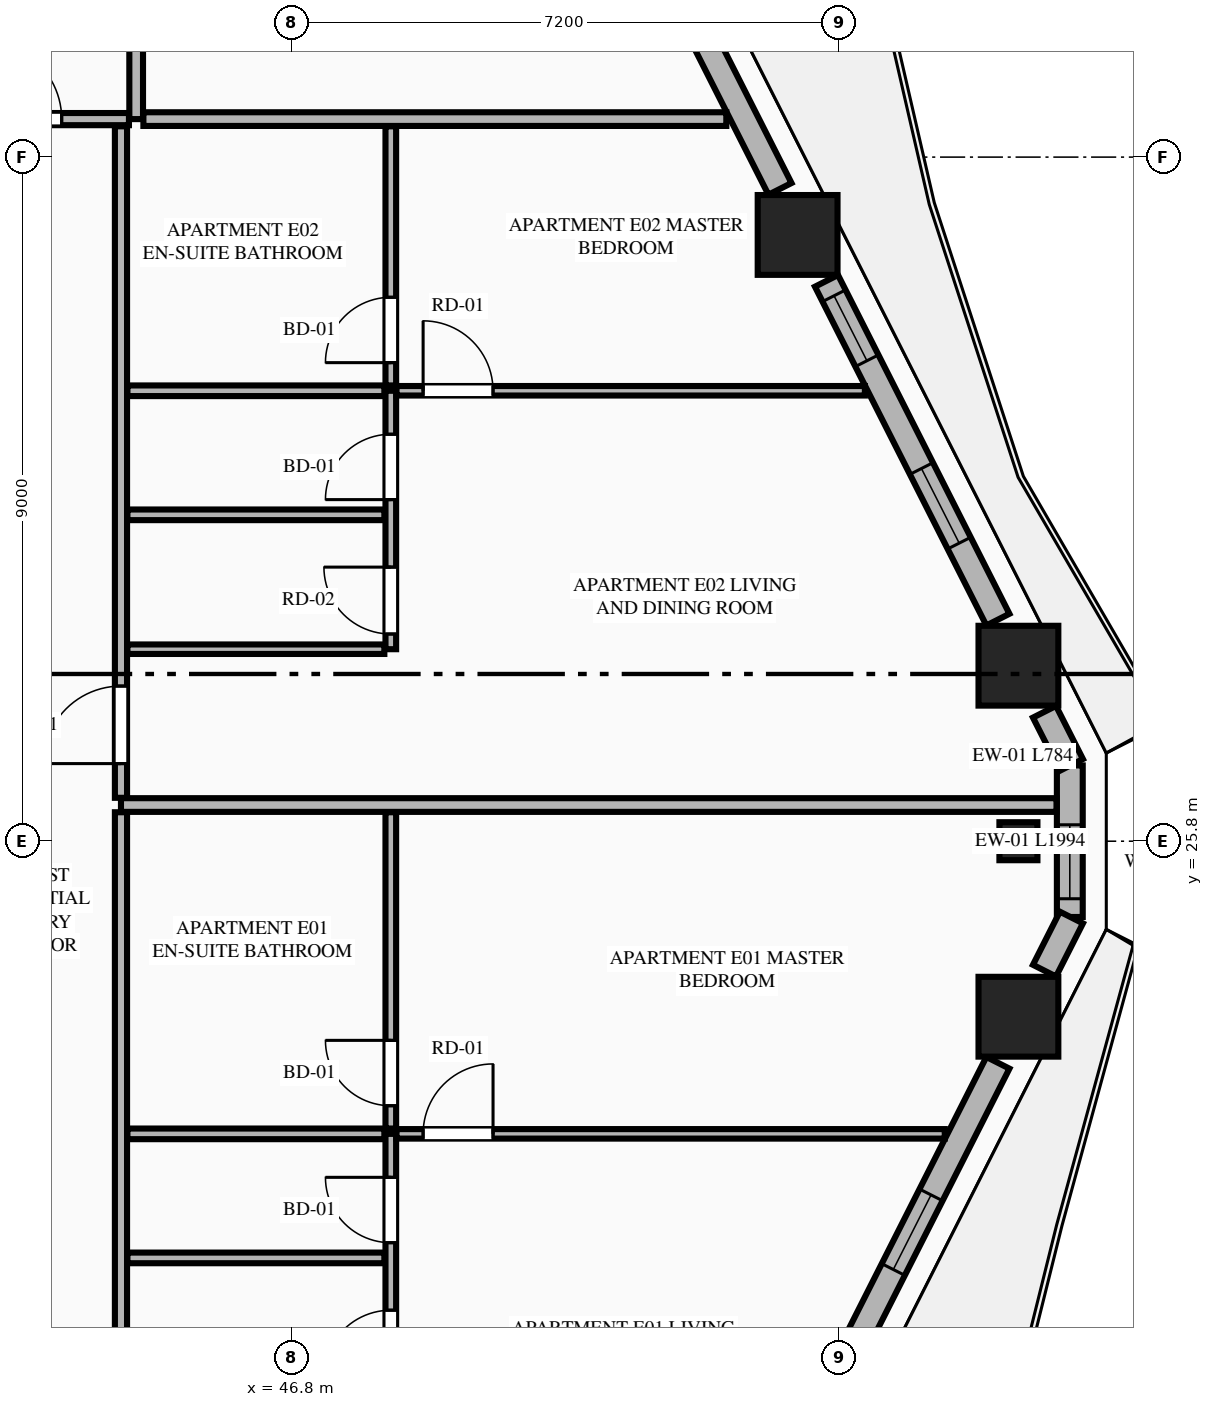
"""IFC4 building model, lengths in metres.
Left out: names, types, materials, properties, quantities, classifications, styles, units other than length and angle.
Written with IfcOpenShell. Run it as: python <this file> out.ifc"""

import sys

from ifc_helpers import new_model, si_unit, direction, frame, frame_2d, origin, origin_2d, place, context, subcontext, project, spatial, rectangle, extrude, element, fill, save


model = new_model("IFC4")
c1 = context("Model", 3, precision=1e-05, world=origin(), true_north=direction((0.0, 1.0)))
c2 = subcontext(c1, "Body", "Model", "MODEL_VIEW")
j1 = project(units=[si_unit("LENGTHUNIT", "METRE"), si_unit("PLANEANGLEUNIT", "RADIAN")], contexts=[c1])
p1 = place(None, origin())
s1 = spatial("IfcSite", under=j1, at=p1, CompositionType="ELEMENT")
p2 = place(p1, origin())
s2 = spatial("IfcBuilding", under=s1, at=p2, CompositionType="ELEMENT")
p3 = place(p2, frame((0.0, 0.0, 105.5)))
s3 = spatial("IfcBuildingStorey", under=s2, at=p3, CompositionType="ELEMENT", Elevation=105.5)
for number, where, z_axis, x_axis in (
    (1, (56.357, 23.491, 0.0), (0.0, 0.0, 1.0), (1.0, 0.0, 0.0)),
    (2, (56.357, 28.109, 0.0), (0.0, 0.0, 1.0), (1.0, 0.0, 0.0)),
    (3, (53.452, 33.776, 0.0), (0.0, 0.0, 1.0), (1.0, 0.0, 0.0)),
):
    element("IfcColumn", number, at=place(p3, frame(where, z_axis=z_axis, x_axis=x_axis)), inside=s3, PredefinedType="COLUMN", context=c2, shape_type="SweptSolid", body=[
        extrude(rectangle(XDim=1.05, YDim=1.05, at=origin_2d()), origin(), (0.0, 0.0, 1.0), 3.55),
    ])
p4 = place(p3, frame((56.357, 25.8, 0.0), z_axis=(0.0, 0.0, 1.0), x_axis=(0.0, 1.0, 0.0)))
e4 = element("IfcColumn", 4, at=p4, inside=s3, PredefinedType="PILASTER", context=c2, shape_type="SweptSolid", body=[
    extrude(rectangle(XDim=0.5, YDim=0.35, at=origin_2d()), origin(), (0.0, 0.0, 1.0), 3.55),
])
p5 = place(p3, frame((57.033, 24.803, 0.0), z_axis=(0.0, 0.0, 1.0), x_axis=(0.0, 1.0, 0.0)))
e5 = element("IfcWall", 5, at=p5, inside=s3, PredefinedType="STANDARD", context=c2, shape_type="SweptSolid", body=[
    extrude(rectangle(XDim=1.994, YDim=0.34, at=frame_2d((0.997, 0.0))), origin(), (0.0, 0.0, 1.0), 3.34),
])
p6 = place(p5, frame((0.24, 0.0, 0.75)))
e6 = element("IfcOpeningElement", 6, at=p6, cuts=e5, PredefinedType="OPENING", context=c2, shape_type="SweptSolid", body=[
    extrude(rectangle(XDim=0.973, YDim=2.0, at=frame_2d((0.486, 1.0))), frame((0.0, 0.18, 0.0), z_axis=(0.0, -1.0, 0.0), x_axis=(1.0, 0.0, 0.0)), (0.0, 0.0, 1.0), 0.36),
])
p7 = place(p3, frame((53.832, 18.428, 0.0), z_axis=(0.0, 0.0, 1.0), x_axis=(0.451431617681, 0.892305718102, 0.0)))
e7 = element("IfcWall", 7, at=p7, inside=s3, PredefinedType="STANDARD", context=c2, shape_type="SweptSolid", body=[
    extrude(rectangle(XDim=4.995, YDim=0.34, at=frame_2d((2.498, 0.0))), origin(), (0.0, 0.0, 1.0), 2.797),
])
p8 = place(p7, frame((1.947, 0.0, 0.75)))
e8 = element("IfcOpeningElement", 8, at=p8, cuts=e7, PredefinedType="OPENING", context=c2, shape_type="SweptSolid", body=[
    extrude(rectangle(XDim=1.1, YDim=1.897, at=frame_2d((0.55, 0.948))), frame((0.0, 0.18, 0.0), z_axis=(0.0, -1.0, 0.0), x_axis=(1.0, 0.0, 0.0)), (0.0, 0.0, 1.0), 0.36),
])
for number, where, z_axis, x_axis in (
    (9, (56.7, 24.097, 0.0), (0.0, 0.0, 1.0), (0.452, 0.892, 0.0)),
    (10, (57.054, 26.804, 0.0), (0.0, 0.0, 1.0), (-0.452, 0.892, 0.0)),
):
    element("IfcWall", number, at=place(p3, frame(where, z_axis=z_axis, x_axis=x_axis)), inside=s3, PredefinedType="STANDARD", context=c2, shape_type="SweptSolid", body=[
        extrude(rectangle(XDim=0.783, YDim=0.34, at=frame_2d((0.392, 0.0))), origin(), (0.0, 0.0, 1.0), 3.34),
    ])
p9 = place(p3, frame((56.087, 28.715, 0.0), z_axis=(0.0, 0.0, 1.0), x_axis=(-0.451431617681, 0.892305718102, 0.0)))
e11 = element("IfcWall", 11, at=p9, inside=s3, PredefinedType="STANDARD", context=c2, shape_type="SweptSolid", body=[
    extrude(rectangle(XDim=4.995, YDim=0.34, at=frame_2d((2.498, 0.0))), origin(), (0.0, 0.0, 1.0), 2.797),
])
p10 = place(p9, frame((1.128, 0.0, 0.75)))
e12 = element("IfcOpeningElement", 12, at=p10, cuts=e11, PredefinedType="OPENING", context=c2, shape_type="SweptSolid", body=[
    extrude(rectangle(XDim=1.1, YDim=1.897, at=frame_2d((0.55, 0.948))), frame((0.0, 0.18, 0.0), z_axis=(0.0, -1.0, 0.0), x_axis=(1.0, 0.0, 0.0)), (0.0, 0.0, 1.0), 0.36),
])
p11 = place(p9, frame((3.817, 0.0, 0.75)))
e13 = element("IfcOpeningElement", 13, at=p11, cuts=e11, PredefinedType="OPENING", context=c2, shape_type="SweptSolid", body=[
    extrude(rectangle(XDim=0.958, YDim=1.897, at=frame_2d((0.479, 0.948))), frame((0.0, 0.18, 0.0), z_axis=(0.0, -1.0, 0.0), x_axis=(1.0, 0.0, 0.0)), (0.0, 0.0, 1.0), 0.36),
])
p12 = place(p3, frame((53.22, 34.382, 0.0), z_axis=(0.0, 0.0, 1.0), x_axis=(-0.451567731634, 0.892236842855, 0.0)))
e14 = element("IfcWall", 14, at=p12, inside=s3, PredefinedType="STANDARD", context=c2, shape_type="SweptSolid", body=[
    extrude(rectangle(XDim=5.219, YDim=0.34, at=frame_2d((2.61, 0.0))), origin(), (0.0, 0.0, 1.0), 2.797),
])
p13 = place(p12, frame((2.699, 0.0, 0.0)))
e15 = element("IfcOpeningElement", 15, at=p13, cuts=e14, PredefinedType="OPENING", context=c2, shape_type="SweptSolid", body=[
    extrude(rectangle(XDim=1.1, YDim=2.25, at=frame_2d((0.55, 1.125))), frame((0.0, 0.18, 0.0), z_axis=(0.0, -1.0, 0.0), x_axis=(1.0, 0.0, 0.0)), (0.0, 0.0, 1.0), 0.36),
])
p14 = place(p3, frame((44.75, 35.3, 0.0), z_axis=(0.0, 0.0, 1.0), x_axis=(0.0, 1.0, 0.0)))
e16 = element("IfcWall", 16, at=p14, inside=s3, PredefinedType="PARTITIONING", context=c2, shape_type="SweptSolid", body=[
    extrude(rectangle(XDim=12.195, YDim=0.18, at=frame_2d((6.098, 0.0))), origin(), (0.0, 0.0, 1.0), 3.34),
])
p15 = place(p3, frame((28.663, 35.3, 0.0), z_axis=(0.0, 0.0, 1.0), x_axis=(1.0, 0.0, 0.0)))
e17 = element("IfcWall", 17, at=p15, inside=s3, PredefinedType="PARTITIONING", context=c2, shape_type="SweptSolid", body=[
    extrude(rectangle(XDim=15.992, YDim=0.16, at=frame_2d((7.996, 0.0))), origin(), (0.0, 0.0, 1.0), 3.34),
])
p16 = place(p15, frame((14.087, 0.0, 0.0)))
e18 = element("IfcOpeningElement", 18, at=p16, cuts=e17, PredefinedType="OPENING", context=c2, shape_type="SweptSolid", body=[
    extrude(rectangle(XDim=1.02, YDim=2.25, at=frame_2d((0.51, 1.125))), frame((0.0, 0.09, 0.0), z_axis=(0.0, -1.0, 0.0), x_axis=(1.0, 0.0, 0.0)), (0.0, 0.0, 1.0), 0.18),
])
p17 = place(p3, frame((44.845, 35.3, 0.0), z_axis=(0.0, 0.0, 1.0), x_axis=(1.0, 0.0, 0.0)))
e19 = element("IfcWall", 19, at=p17, inside=s3, PredefinedType="PARTITIONING", context=c2, shape_type="SweptSolid", body=[
    extrude(rectangle(XDim=7.669, YDim=0.18, at=frame_2d((3.834, 0.0))), origin(), (0.0, 0.0, 1.0), 3.34),
])
p18 = place(p3, frame((44.55, 16.595, 0.0), z_axis=(0.0, 0.0, 1.0), x_axis=(0.0, 1.0, 0.0)))
e20 = element("IfcWall", 20, at=p18, inside=s3, PredefinedType="PARTITIONING", context=c2, shape_type="SweptSolid", body=[
    extrude(rectangle(XDim=9.586, YDim=0.16, at=frame_2d((4.793, 0.0))), origin(), (0.0, 0.0, 1.0), 3.34),
])
p19 = place(p18, frame((0.45, 0.0, 0.0)))
e21 = element("IfcOpeningElement", 21, at=p19, cuts=e20, PredefinedType="OPENING", context=c2, shape_type="SweptSolid", body=[
    extrude(rectangle(XDim=1.02, YDim=2.25, at=frame_2d((0.51, 1.125))), frame((0.0, 0.09, 0.0), z_axis=(0.0, -1.0, 0.0), x_axis=(1.0, 0.0, 0.0)), (0.0, 0.0, 1.0), 0.18),
])
p20 = place(p3, frame((48.1, 18.55, 0.0), z_axis=(0.0, 0.0, 1.0), x_axis=(0.0, 1.0, 0.0)))
e22 = element("IfcWall", 22, at=p20, inside=s3, PredefinedType="PLUMBINGWALL", context=c2, shape_type="SweptSolid", body=[
    extrude(rectangle(XDim=3.4, YDim=0.14, at=frame_2d((1.7, 0.0))), origin(), (0.0, 0.0, 1.0), 3.34),
])
p21 = place(p20, frame((0.2, 0.0, 0.0)))
e23 = element("IfcOpeningElement", 23, at=p21, cuts=e22, PredefinedType="OPENING", context=c2, shape_type="SweptSolid", body=[
    extrude(rectangle(XDim=0.88, YDim=2.15, at=frame_2d((0.44, 1.075))), frame((0.0, 0.08, 0.0), z_axis=(0.0, -1.0, 0.0), x_axis=(1.0, 0.0, 0.0)), (0.0, 0.0, 1.0), 0.16),
])
p22 = place(p20, frame((1.968, 0.0, 0.0)))
e24 = element("IfcOpeningElement", 24, at=p22, cuts=e22, PredefinedType="OPENING", context=c2, shape_type="SweptSolid", body=[
    extrude(rectangle(XDim=0.86, YDim=2.1, at=frame_2d((0.43, 1.05))), frame((0.0, 0.08, 0.0), z_axis=(0.0, -1.0, 0.0), x_axis=(1.0, 0.0, 0.0)), (0.0, 0.0, 1.0), 0.16),
])
p23 = place(p3, frame((48.1, 22.02, 0.0), z_axis=(0.0, 0.0, 1.0), x_axis=(0.0, 1.0, 0.0)))
e25 = element("IfcWall", 25, at=p23, inside=s3, PredefinedType="PLUMBINGWALL", context=c2, shape_type="SweptSolid", body=[
    extrude(rectangle(XDim=4.161, YDim=0.14, at=frame_2d((2.081, 0.0))), origin(), (0.0, 0.0, 1.0), 3.34),
])
p24 = place(p23, frame((0.3, 0.0, 0.0)))
e26 = element("IfcOpeningElement", 26, at=p24, cuts=e25, PredefinedType="OPENING", context=c2, shape_type="SweptSolid", body=[
    extrude(rectangle(XDim=0.86, YDim=2.1, at=frame_2d((0.43, 1.05))), frame((0.0, 0.08, 0.0), z_axis=(0.0, -1.0, 0.0), x_axis=(1.0, 0.0, 0.0)), (0.0, 0.0, 1.0), 0.16),
])
p25 = place(p3, frame((44.635, 21.95, 0.0), z_axis=(0.0, 0.0, 1.0), x_axis=(1.0, 0.0, 0.0)))
e27 = element("IfcWall", 27, at=p25, inside=s3, PredefinedType="PLUMBINGWALL", context=c2, shape_type="SweptSolid", body=[
    extrude(rectangle(XDim=3.38, YDim=0.14, at=frame_2d((1.69, 0.0))), origin(), (0.0, 0.0, 1.0), 3.34),
])
p26 = place(p3, frame((48.175, 21.95, 0.0), z_axis=(0.0, 0.0, 1.0), x_axis=(1.0, 0.0, 0.0)))
e28 = element("IfcWall", 28, at=p26, inside=s3, PredefinedType="PARTITIONING", context=c2, shape_type="SweptSolid", body=[
    extrude(rectangle(XDim=7.213, YDim=0.125, at=frame_2d((3.606, 0.0))), origin(), (0.0, 0.0, 1.0), 3.34),
])
p27 = place(p26, frame((0.35, 0.0, 0.0)))
e29 = element("IfcOpeningElement", 29, at=p27, cuts=e28, PredefinedType="OPENING", context=c2, shape_type="SweptSolid", body=[
    extrude(rectangle(XDim=0.92, YDim=2.15, at=frame_2d((0.46, 1.075))), frame((0.0, 0.073, 0.0), z_axis=(0.0, -1.0, 0.0), x_axis=(1.0, 0.0, 0.0)), (0.0, 0.0, 1.0), 0.145),
])
p28 = place(p3, frame((44.635, 20.318, 0.0), z_axis=(0.0, 0.0, 1.0), x_axis=(1.0, 0.0, 0.0)))
e30 = element("IfcWall", 30, at=p28, inside=s3, PredefinedType="PLUMBINGWALL", context=c2, shape_type="SweptSolid", body=[
    extrude(rectangle(XDim=3.38, YDim=0.14, at=frame_2d((1.69, 0.0))), origin(), (0.0, 0.0, 1.0), 3.34),
])
p29 = place(p3, frame((44.55, 26.276, 0.0), z_axis=(0.0, 0.0, 1.0), x_axis=(1.0, 0.0, 0.0)))
e31 = element("IfcWall", 31, at=p29, inside=s3, PredefinedType="PARTITIONING", context=c2, shape_type="SweptSolid", body=[
    extrude(rectangle(XDim=12.308, YDim=0.18, at=frame_2d((6.154, 0.0))), origin(), (0.0, 0.0, 1.0), 3.34),
])
p30 = place(p3, frame((44.55, 26.371, 0.0), z_axis=(0.0, 0.0, 1.0), x_axis=(0.0, 1.0, 0.0)))
e32 = element("IfcWall", 32, at=p30, inside=s3, PredefinedType="PARTITIONING", context=c2, shape_type="SweptSolid", body=[
    extrude(rectangle(XDim=8.834, YDim=0.16, at=frame_2d((4.417, 0.0))), origin(), (0.0, 0.0, 1.0), 3.34),
])
p31 = place(p30, frame((0.45, 0.0, 0.0)))
e33 = element("IfcOpeningElement", 33, at=p31, cuts=e32, PredefinedType="OPENING", context=c2, shape_type="SweptSolid", body=[
    extrude(rectangle(XDim=1.02, YDim=2.25, at=frame_2d((0.51, 1.125))), frame((0.0, 0.09, 0.0), z_axis=(0.0, -1.0, 0.0), x_axis=(1.0, 0.0, 0.0)), (0.0, 0.0, 1.0), 0.18),
])
p32 = place(p3, frame((44.635, 28.326, 0.0), z_axis=(0.0, 0.0, 1.0), x_axis=(1.0, 0.0, 0.0)))
e34 = element("IfcWall", 34, at=p32, inside=s3, PredefinedType="PARTITIONING", context=c2, shape_type="SweptSolid", body=[
    extrude(rectangle(XDim=3.38, YDim=0.125, at=frame_2d((1.69, 0.0))), origin(), (0.0, 0.0, 1.0), 3.34),
])
p33 = place(p3, frame((48.1, 28.326, 0.0), z_axis=(0.0, 0.0, 1.0), x_axis=(0.0, 1.0, 0.0)))
e35 = element("IfcWall", 35, at=p33, inside=s3, PredefinedType="PLUMBINGWALL", context=c2, shape_type="SweptSolid", body=[
    extrude(rectangle(XDim=3.4, YDim=0.14, at=frame_2d((1.7, 0.0))), origin(), (0.0, 0.0, 1.0), 3.34),
])
p34 = place(p33, frame((0.2, 0.0, 0.0)))
e36 = element("IfcOpeningElement", 36, at=p34, cuts=e35, PredefinedType="OPENING", context=c2, shape_type="SweptSolid", body=[
    extrude(rectangle(XDim=0.88, YDim=2.15, at=frame_2d((0.44, 1.075))), frame((0.0, 0.08, 0.0), z_axis=(0.0, -1.0, 0.0), x_axis=(1.0, 0.0, 0.0)), (0.0, 0.0, 1.0), 0.16),
])
p35 = place(p33, frame((1.968, 0.0, 0.0)))
e37 = element("IfcOpeningElement", 37, at=p35, cuts=e35, PredefinedType="OPENING", context=c2, shape_type="SweptSolid", body=[
    extrude(rectangle(XDim=0.86, YDim=2.1, at=frame_2d((0.43, 1.05))), frame((0.0, 0.08, 0.0), z_axis=(0.0, -1.0, 0.0), x_axis=(1.0, 0.0, 0.0)), (0.0, 0.0, 1.0), 0.16),
])
p36 = place(p3, frame((48.1, 31.796, 0.0), z_axis=(0.0, 0.0, 1.0), x_axis=(0.0, 1.0, 0.0)))
e38 = element("IfcWall", 38, at=p36, inside=s3, PredefinedType="PLUMBINGWALL", context=c2, shape_type="SweptSolid", body=[
    extrude(rectangle(XDim=3.409, YDim=0.14, at=frame_2d((1.705, 0.0))), origin(), (0.0, 0.0, 1.0), 3.34),
])
p37 = place(p36, frame((0.3, 0.0, 0.0)))
e39 = element("IfcOpeningElement", 39, at=p37, cuts=e38, PredefinedType="OPENING", context=c2, shape_type="SweptSolid", body=[
    extrude(rectangle(XDim=0.86, YDim=2.1, at=frame_2d((0.43, 1.05))), frame((0.0, 0.08, 0.0), z_axis=(0.0, -1.0, 0.0), x_axis=(1.0, 0.0, 0.0)), (0.0, 0.0, 1.0), 0.16),
])
p38 = place(p3, frame((44.635, 31.726, 0.0), z_axis=(0.0, 0.0, 1.0), x_axis=(1.0, 0.0, 0.0)))
e40 = element("IfcWall", 40, at=p38, inside=s3, PredefinedType="PLUMBINGWALL", context=c2, shape_type="SweptSolid", body=[
    extrude(rectangle(XDim=3.38, YDim=0.14, at=frame_2d((1.69, 0.0))), origin(), (0.0, 0.0, 1.0), 3.34),
])
p39 = place(p3, frame((48.175, 31.726, 0.0), z_axis=(0.0, 0.0, 1.0), x_axis=(1.0, 0.0, 0.0)))
e41 = element("IfcWall", 41, at=p39, inside=s3, PredefinedType="PARTITIONING", context=c2, shape_type="SweptSolid", body=[
    extrude(rectangle(XDim=6.162, YDim=0.125, at=frame_2d((3.081, 0.0))), origin(), (0.0, 0.0, 1.0), 3.34),
])
p40 = place(p39, frame((0.35, 0.0, 0.0)))
e42 = element("IfcOpeningElement", 42, at=p40, cuts=e41, PredefinedType="OPENING", context=c2, shape_type="SweptSolid", body=[
    extrude(rectangle(XDim=0.92, YDim=2.15, at=frame_2d((0.46, 1.075))), frame((0.0, 0.073, 0.0), z_axis=(0.0, -1.0, 0.0), x_axis=(1.0, 0.0, 0.0)), (0.0, 0.0, 1.0), 0.145),
])
p41 = place(p3, frame((44.635, 30.094, 0.0), z_axis=(0.0, 0.0, 1.0), x_axis=(1.0, 0.0, 0.0)))
e43 = element("IfcWall", 43, at=p41, inside=s3, PredefinedType="PLUMBINGWALL", context=c2, shape_type="SweptSolid", body=[
    extrude(rectangle(XDim=3.38, YDim=0.14, at=frame_2d((1.69, 0.0))), origin(), (0.0, 0.0, 1.0), 3.34),
])
p42 = place(p8, origin())
e44 = element("IfcWindow", 44, at=p42, inside=s3, PartitioningType="SINGLE_PANEL", PredefinedType="WINDOW", context=c2, shape_type="SweptSolid", body=[
    extrude(rectangle(XDim=1.1, YDim=1.897, at=frame_2d((0.55, 0.948))), frame((0.0, 0.03, 0.0), z_axis=(0.0, -1.0, 0.0), x_axis=(1.0, 0.0, 0.0)), (0.0, 0.0, 1.0), 0.06),
])
fill(e8, e44)
p43 = place(p10, origin())
e45 = element("IfcWindow", 45, at=p43, inside=s3, PartitioningType="SINGLE_PANEL", PredefinedType="WINDOW", context=c2, shape_type="SweptSolid", body=[
    extrude(rectangle(XDim=1.1, YDim=1.897, at=frame_2d((0.55, 0.948))), frame((0.0, 0.03, 0.0), z_axis=(0.0, -1.0, 0.0), x_axis=(1.0, 0.0, 0.0)), (0.0, 0.0, 1.0), 0.06),
])
fill(e12, e45)
p44 = place(p16, origin())
e46 = element("IfcDoor", 46, at=p44, inside=s3, OperationType="SINGLE_SWING_LEFT", PredefinedType="DOOR", context=c2, shape_type="SweptSolid", body=[
    extrude(rectangle(XDim=1.02, YDim=2.25, at=frame_2d((0.51, 1.125))), frame((0.0, 0.025, 0.0), z_axis=(0.0, -1.0, 0.0), x_axis=(1.0, 0.0, 0.0)), (0.0, 0.0, 1.0), 0.05),
])
fill(e18, e46)
p45 = place(p21, origin())
e47 = element("IfcDoor", 47, at=p45, inside=s3, OperationType="SINGLE_SWING_LEFT", PredefinedType="DOOR", context=c2, shape_type="SweptSolid", body=[
    extrude(rectangle(XDim=0.88, YDim=2.15, at=frame_2d((0.44, 1.075))), frame((0.0, 0.025, 0.0), z_axis=(0.0, -1.0, 0.0), x_axis=(1.0, 0.0, 0.0)), (0.0, 0.0, 1.0), 0.05),
])
fill(e23, e47)
p46 = place(p22, origin())
e48 = element("IfcDoor", 48, at=p46, inside=s3, OperationType="SINGLE_SWING_RIGHT", PredefinedType="DOOR", context=c2, shape_type="SweptSolid", body=[
    extrude(rectangle(XDim=0.86, YDim=2.1, at=frame_2d((0.43, 1.05))), frame((0.0, 0.025, 0.0), z_axis=(0.0, -1.0, 0.0), x_axis=(1.0, 0.0, 0.0)), (0.0, 0.0, 1.0), 0.05),
])
fill(e24, e48)
p47 = place(p24, origin())
e49 = element("IfcDoor", 49, at=p47, inside=s3, OperationType="SINGLE_SWING_RIGHT", PredefinedType="DOOR", context=c2, shape_type="SweptSolid", body=[
    extrude(rectangle(XDim=0.86, YDim=2.1, at=frame_2d((0.43, 1.05))), frame((0.0, 0.025, 0.0), z_axis=(0.0, -1.0, 0.0), x_axis=(1.0, 0.0, 0.0)), (0.0, 0.0, 1.0), 0.05),
])
fill(e26, e49)
p48 = place(p27, origin())
e50 = element("IfcDoor", 50, at=p48, inside=s3, OperationType="SINGLE_SWING_RIGHT", PredefinedType="DOOR", context=c2, shape_type="SweptSolid", body=[
    extrude(rectangle(XDim=0.92, YDim=2.15, at=frame_2d((0.46, 1.075))), frame((0.0, 0.025, 0.0), z_axis=(0.0, -1.0, 0.0), x_axis=(1.0, 0.0, 0.0)), (0.0, 0.0, 1.0), 0.05),
])
fill(e29, e50)
p49 = place(p34, origin())
e51 = element("IfcDoor", 51, at=p49, inside=s3, OperationType="SINGLE_SWING_RIGHT", PredefinedType="DOOR", context=c2, shape_type="SweptSolid", body=[
    extrude(rectangle(XDim=0.88, YDim=2.15, at=frame_2d((0.44, 1.075))), frame((0.0, 0.025, 0.0), z_axis=(0.0, -1.0, 0.0), x_axis=(1.0, 0.0, 0.0)), (0.0, 0.0, 1.0), 0.05),
])
fill(e36, e51)
p50 = place(p35, origin())
e52 = element("IfcDoor", 52, at=p50, inside=s3, OperationType="SINGLE_SWING_LEFT", PredefinedType="DOOR", context=c2, shape_type="SweptSolid", body=[
    extrude(rectangle(XDim=0.86, YDim=2.1, at=frame_2d((0.43, 1.05))), frame((0.0, 0.025, 0.0), z_axis=(0.0, -1.0, 0.0), x_axis=(1.0, 0.0, 0.0)), (0.0, 0.0, 1.0), 0.05),
])
fill(e37, e52)
p51 = place(p37, origin())
e53 = element("IfcDoor", 53, at=p51, inside=s3, OperationType="SINGLE_SWING_LEFT", PredefinedType="DOOR", context=c2, shape_type="SweptSolid", body=[
    extrude(rectangle(XDim=0.86, YDim=2.1, at=frame_2d((0.43, 1.05))), frame((0.0, 0.025, 0.0), z_axis=(0.0, -1.0, 0.0), x_axis=(1.0, 0.0, 0.0)), (0.0, 0.0, 1.0), 0.05),
])
fill(e39, e53)
p52 = place(p31, origin())
e54 = element("IfcDoor", 54, at=p52, inside=s3, OperationType="SINGLE_SWING_LEFT", PredefinedType="DOOR", context=c2, shape_type="SweptSolid", body=[
    extrude(rectangle(XDim=1.02, YDim=2.25, at=frame_2d((0.51, 1.125))), frame((0.0, 0.025, 0.0), z_axis=(0.0, -1.0, 0.0), x_axis=(1.0, 0.0, 0.0)), (0.0, 0.0, 1.0), 0.05),
])
fill(e33, e54)
p53 = place(p40, origin())
e55 = element("IfcDoor", 55, at=p53, inside=s3, OperationType="SINGLE_SWING_LEFT", PredefinedType="DOOR", context=c2, shape_type="SweptSolid", body=[
    extrude(rectangle(XDim=0.92, YDim=2.15, at=frame_2d((0.46, 1.075))), frame((0.0, 0.025, 0.0), z_axis=(0.0, -1.0, 0.0), x_axis=(1.0, 0.0, 0.0)), (0.0, 0.0, 1.0), 0.05),
])
fill(e42, e55)
p54 = place(p11, origin())
e56 = element("IfcWindow", 56, at=p54, inside=s3, PartitioningType="SINGLE_PANEL", PredefinedType="WINDOW", context=c2, shape_type="SweptSolid", body=[
    extrude(rectangle(XDim=0.958, YDim=1.897, at=frame_2d((0.479, 0.948))), frame((0.0, 0.03, 0.0), z_axis=(0.0, -1.0, 0.0), x_axis=(1.0, 0.0, 0.0)), (0.0, 0.0, 1.0), 0.06),
])
fill(e13, e56)
p55 = place(p6, origin())
e57 = element("IfcWindow", 57, at=p55, inside=s3, PartitioningType="SINGLE_PANEL", PredefinedType="WINDOW", context=c2, shape_type="SweptSolid", body=[
    extrude(rectangle(XDim=0.973, YDim=2.0, at=frame_2d((0.486, 1.0))), frame((0.0, 0.03, 0.0), z_axis=(0.0, -1.0, 0.0), x_axis=(1.0, 0.0, 0.0)), (0.0, 0.0, 1.0), 0.06),
])
fill(e6, e57)
save(model, sys.argv[1])
